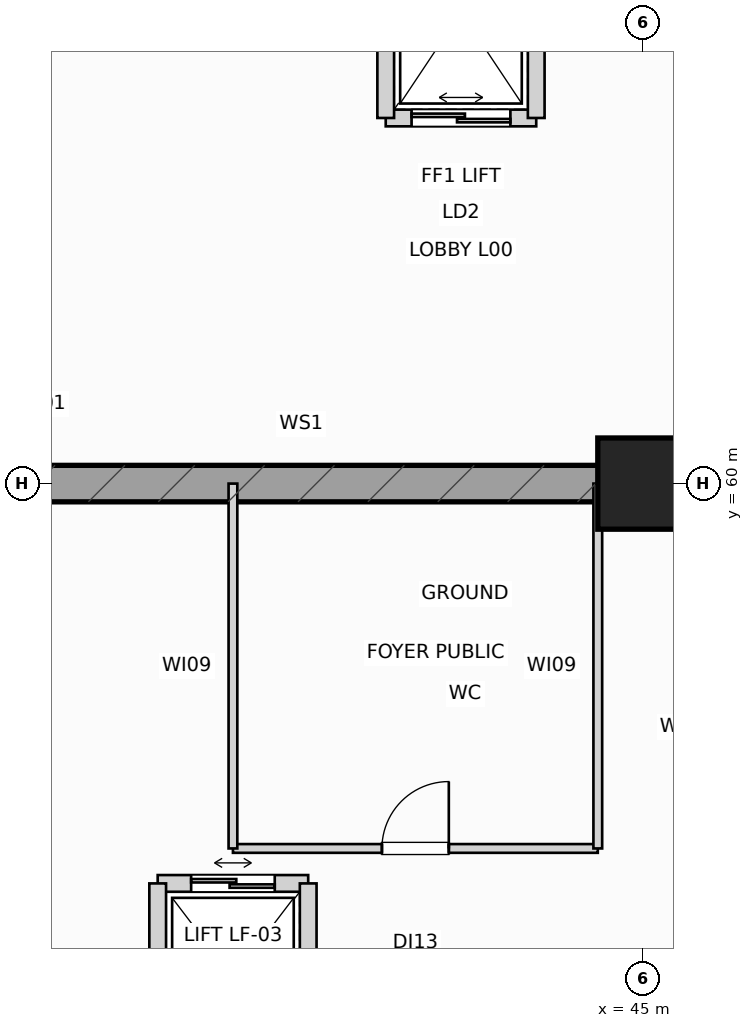
"""IFC4 building model, lengths in metres.
Left out: names, types, materials, properties, quantities, classifications, styles, units other than length and angle.
Written with IfcOpenShell. Run it as: python <this file> out.ifc"""

import sys

from ifc_helpers import new_model, si_unit, direction, frame, frame_2d, origin, origin_2d, place, context, subcontext, project, spatial, rectangle, extrude, element, fill, save


model = new_model("IFC4")
c1 = context("Model", 3, precision=1e-05, world=origin(), true_north=direction((0.0, 1.0)))
c2 = subcontext(c1, "Body", "Model", "MODEL_VIEW")
j1 = project(units=[si_unit("LENGTHUNIT", "METRE"), si_unit("PLANEANGLEUNIT", "RADIAN")], contexts=[c1])
p1 = place(None, origin())
s1 = spatial("IfcSite", under=j1, at=p1, CompositionType="ELEMENT")
p2 = place(p1, origin())
s2 = spatial("IfcBuilding", under=s1, at=p2, CompositionType="ELEMENT")
p3 = place(p2, origin())
s3 = spatial("IfcBuildingStorey", under=s2, at=p3, CompositionType="ELEMENT", Elevation=0.0)
p4 = place(p3, frame((45.0, 60.0, 0.0), z_axis=(0.0, 0.0, 1.0), x_axis=(1.0, 0.0, 0.0)))
e1 = element("IfcColumn", 1, at=p4, inside=s3, PredefinedType="COLUMN", context=c2, shape_type="SweptSolid", body=[
    extrude(rectangle(XDim=1.2, YDim=1.2, at=origin_2d()), origin(), (0.0, 0.0, 1.0), 6.0),
])
p5 = place(p3, frame((36.0, 60.0, 0.0), z_axis=(0.0, 0.0, 1.0), x_axis=(1.0, 0.0, 0.0)))
e2 = element("IfcWall", 2, at=p5, inside=s3, PredefinedType="SHEAR", context=c2, shape_type="SweptSolid", body=[
    extrude(rectangle(XDim=9.0, YDim=0.48, at=frame_2d((4.5, 0.0))), origin(), (0.0, 0.0, 1.0), 5.7),
])
p6 = place(p3, frame((38.61, 54.74, 0.0), z_axis=(0.0, 0.0, 1.0), x_axis=(1.0, 0.0, 0.0)))
e3 = element("IfcWall", 3, at=p6, inside=s3, PredefinedType="PARTITIONING", context=c2, shape_type="SweptSolid", body=[
    extrude(rectangle(XDim=1.98, YDim=0.22, at=frame_2d((0.99, 0.0))), origin(), (0.0, 0.0, 1.0), 5.665),
])
p7 = place(p6, frame((0.44, 0.0, 0.0)))
e4 = element("IfcOpeningElement", 4, at=p7, cuts=e3, PredefinedType="OPENING", context=c2, shape_type="SweptSolid", body=[
    extrude(rectangle(XDim=1.1, YDim=2.18, at=frame_2d((0.55, 1.09))), frame((0.0, 0.12, 0.0), z_axis=(0.0, -1.0, 0.0), x_axis=(1.0, 0.0, 0.0)), (0.0, 0.0, 1.0), 0.24),
])
for number, where, z_axis, x_axis in (
    (5, (38.61, 52.26, 0.0), (0.0, 0.0, 1.0), (0.0, 1.0, 0.0)),
    (6, (40.59, 52.26, 0.0), (0.0, 0.0, 1.0), (0.0, 1.0, 0.0)),
):
    element("IfcWall", number, at=place(p3, frame(where, z_axis=z_axis, x_axis=x_axis)), inside=s3, PredefinedType="PARTITIONING", context=c2, shape_type="SweptSolid", body=[
        extrude(rectangle(XDim=2.48, YDim=0.22, at=frame_2d((1.24, 0.0))), origin(), (0.0, 0.0, 1.0), 5.665),
    ])
p8 = place(p3, frame((41.61, 64.81, 0.0), z_axis=(0.0, 0.0, 1.0), x_axis=(1.0, 0.0, 0.0)))
e7 = element("IfcWall", 7, at=p8, inside=s3, PredefinedType="PARTITIONING", context=c2, shape_type="SweptSolid", body=[
    extrude(rectangle(XDim=1.98, YDim=0.22, at=frame_2d((0.99, 0.0))), origin(), (0.0, 0.0, 1.0), 5.665),
])
p9 = place(p8, frame((0.34, 0.0, 0.0)))
e8 = element("IfcOpeningElement", 8, at=p9, cuts=e7, PredefinedType="OPENING", context=c2, shape_type="SweptSolid", body=[
    extrude(rectangle(XDim=1.3, YDim=2.2, at=frame_2d((0.65, 1.1))), frame((0.0, 0.12, 0.0), z_axis=(0.0, -1.0, 0.0), x_axis=(1.0, 0.0, 0.0)), (0.0, 0.0, 1.0), 0.24),
])
for number, where, z_axis, x_axis in (
    (9, (41.61, 64.81, 0.0), (0.0, 0.0, 1.0), (0.0, 1.0, 0.0)),
    (10, (43.59, 64.81, 0.0), (0.0, 0.0, 1.0), (0.0, 1.0, 0.0)),
):
    element("IfcWall", number, at=place(p3, frame(where, z_axis=z_axis, x_axis=x_axis)), inside=s3, PredefinedType="PARTITIONING", context=c2, shape_type="SweptSolid", body=[
        extrude(rectangle(XDim=2.78, YDim=0.22, at=frame_2d((1.39, 0.0))), origin(), (0.0, 0.0, 1.0), 5.395),
    ])
p10 = place(p3, frame((39.6, 55.2, 0.0), z_axis=(0.0, 0.0, 1.0), x_axis=(1.0, 0.0, 0.0)))
e11 = element("IfcWall", 11, at=p10, inside=s3, PredefinedType="PARTITIONING", context=c2, shape_type="SweptSolid", body=[
    extrude(rectangle(XDim=4.8, YDim=0.115, at=frame_2d((2.4, 0.0))), origin(), (0.0, 0.0, 1.0), 5.665),
])
p11 = place(p10, frame((1.96, 0.0, 0.0)))
e12 = element("IfcOpeningElement", 12, at=p11, cuts=e11, PredefinedType="OPENING", context=c2, shape_type="SweptSolid", body=[
    extrude(rectangle(XDim=0.88, YDim=2.06, at=frame_2d((0.44, 1.03))), frame((0.0, 0.067, 0.0), z_axis=(0.0, -1.0, 0.0), x_axis=(1.0, 0.0, 0.0)), (0.0, 0.0, 1.0), 0.135),
])
for number, where, z_axis, x_axis in (
    (13, (39.6, 55.2, 0.0), (0.0, 0.0, 1.0), (0.0, 1.0, 0.0)),
    (14, (44.4, 55.2, 0.0), (0.0, 0.0, 1.0), (0.0, 1.0, 0.0)),
):
    element("IfcWall", number, at=place(p3, frame(where, z_axis=z_axis, x_axis=x_axis)), inside=s3, PredefinedType="PARTITIONING", context=c2, shape_type="SweptSolid", body=[
        extrude(rectangle(XDim=4.8, YDim=0.115, at=frame_2d((2.4, 0.0))), origin(), (0.0, 0.0, 1.0), 5.075),
    ])
p12 = place(p3, frame((45.0, 60.0, 0.0), z_axis=(0.0, 0.0, 1.0), x_axis=(1.0, 0.0, 0.0)))
e15 = element("IfcWall", 15, at=p12, inside=s3, PredefinedType="PARTITIONING", context=c2, shape_type="SweptSolid", body=[
    extrude(rectangle(XDim=11.6, YDim=0.2, at=frame_2d((5.8, 0.0))), origin(), (0.0, 0.0, 1.0), 5.065),
])
p13 = place(p7, origin())
e16 = element("IfcDoor", 16, at=p13, inside=s3, OperationType="DOUBLE_DOOR_SLIDING", PredefinedType="DOOR", context=c2, shape_type="SweptSolid", body=[
    extrude(rectangle(XDim=1.1, YDim=2.18, at=frame_2d((0.55, 1.09))), frame((0.0, 0.025, 0.0), z_axis=(0.0, -1.0, 0.0), x_axis=(1.0, 0.0, 0.0)), (0.0, 0.0, 1.0), 0.05),
])
fill(e4, e16)
p14 = place(p9, origin())
e17 = element("IfcDoor", 17, at=p14, inside=s3, OperationType="DOUBLE_DOOR_SLIDING", PredefinedType="DOOR", context=c2, shape_type="SweptSolid", body=[
    extrude(rectangle(XDim=1.3, YDim=2.2, at=frame_2d((0.65, 1.1))), frame((0.0, 0.025, 0.0), z_axis=(0.0, -1.0, 0.0), x_axis=(1.0, 0.0, 0.0)), (0.0, 0.0, 1.0), 0.05),
])
fill(e8, e17)
p15 = place(p11, origin())
e18 = element("IfcDoor", 18, at=p15, inside=s3, OperationType="SINGLE_SWING_RIGHT", PredefinedType="DOOR", context=c2, shape_type="SweptSolid", body=[
    extrude(rectangle(XDim=0.88, YDim=2.06, at=frame_2d((0.44, 1.03))), frame((0.0, 0.025, 0.0), z_axis=(0.0, -1.0, 0.0), x_axis=(1.0, 0.0, 0.0)), (0.0, 0.0, 1.0), 0.05),
])
fill(e12, e18)
save(model, sys.argv[1])
